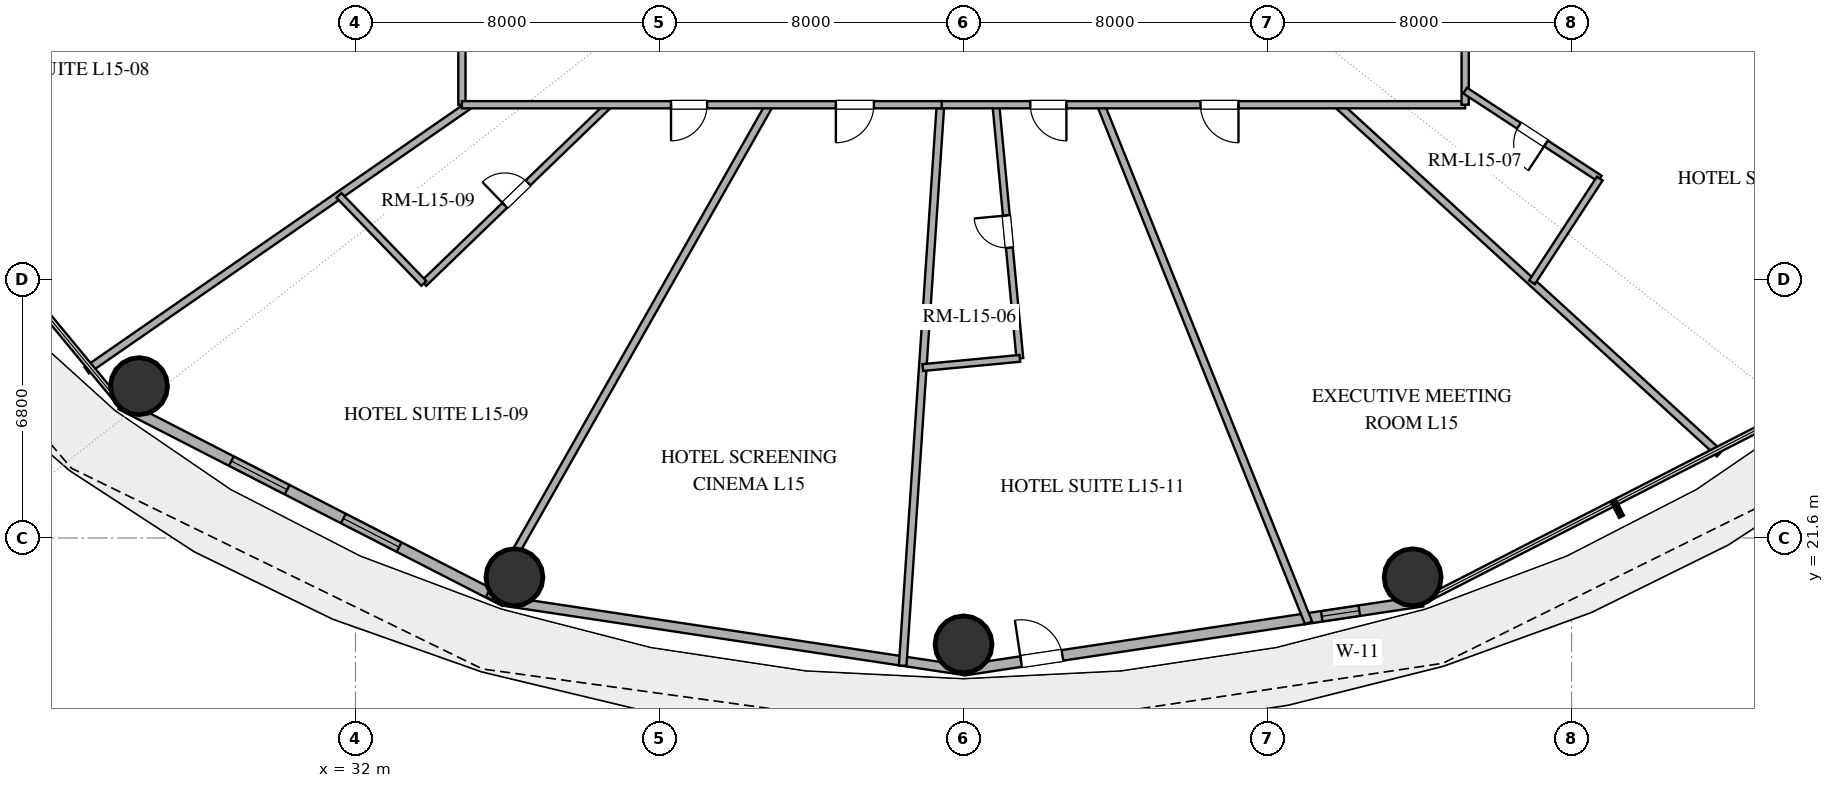
"""IFC4 building model, lengths in metres.
Left out: names, types, materials, properties, quantities, classifications, styles, units other than length and angle.
Written with IfcOpenShell. Run it as: python <this file> out.ifc"""

import sys

from ifc_helpers import new_model, si_unit, direction, frame, frame_2d, origin, origin_2d, place, context, subcontext, project, spatial, rectangle, hollow_circle, extrude, element, fill, save


model = new_model("IFC4")
c1 = context("Model", 3, precision=1e-05, world=origin(), true_north=direction((0.0, 1.0)))
c2 = subcontext(c1, "Body", "Model", "MODEL_VIEW")
j1 = project(units=[si_unit("LENGTHUNIT", "METRE"), si_unit("PLANEANGLEUNIT", "RADIAN")], contexts=[c1])
p1 = place(None, origin())
s1 = spatial("IfcSite", under=j1, at=p1, CompositionType="ELEMENT")
p2 = place(p1, origin())
s2 = spatial("IfcBuilding", under=s1, at=p2, CompositionType="ELEMENT")
p3 = place(p2, frame((0.0, 0.0, 64.2)))
s3 = spatial("IfcBuildingStorey", under=s2, at=p3, CompositionType="ELEMENT", Elevation=64.2)
for number, where, z_axis, x_axis in (
    (1, (26.303, 25.595, 0.0), (0.0, 0.0, 1.0), (1.0, 0.0, 0.0)),
    (2, (36.182, 20.566, 0.0), (0.0, 0.0, 1.0), (1.0, 0.0, 0.0)),
    (3, (48.0, 18.8, 0.0), (0.0, 0.0, 1.0), (1.0, 0.0, 0.0)),
    (4, (59.818, 20.566, 0.0), (0.0, 0.0, 1.0), (1.0, 0.0, 0.0)),
):
    element("IfcColumn", number, at=place(p3, frame(where, z_axis=z_axis, x_axis=x_axis)), inside=s3, PredefinedType="COLUMN", context=c2, shape_type="SweptSolid", body=[
        extrude(hollow_circle(Radius=0.75, WallThickness=0.04, at=origin_2d()), origin(), (0.0, 0.0, 1.0), 3.38),
    ])
p4 = place(p3, frame((25.826, 25.114, 0.0), z_axis=(0.0, 0.0, 1.0), x_axis=(0.889853976658, -0.456245438581, 0.0)))
e5 = element("IfcWall", 5, at=p4, inside=s3, PredefinedType="SOLIDWALL", context=c2, shape_type="SweptSolid", body=[
    extrude(rectangle(XDim=11.346, YDim=0.28, at=frame_2d((5.673, 0.0))), origin(), (0.0, 0.0, 1.0), 3.38),
])
p5 = place(p4, frame((3.267, 0.0, 0.85)))
e6 = element("IfcOpeningElement", 6, at=p5, cuts=e5, PredefinedType="OPENING", context=c2, shape_type="SweptSolid", body=[
    extrude(rectangle(XDim=1.65, YDim=2.0, at=frame_2d((0.825, 1.0))), frame((0.0, 0.15, 0.0), z_axis=(0.0, -1.0, 0.0), x_axis=(1.0, 0.0, 0.0)), (0.0, 0.0, 1.0), 0.3),
])
p6 = place(p4, frame((6.579, 0.0, 0.85)))
e7 = element("IfcOpeningElement", 7, at=p6, cuts=e5, PredefinedType="OPENING", context=c2, shape_type="SweptSolid", body=[
    extrude(rectangle(XDim=1.65, YDim=2.0, at=frame_2d((0.825, 1.0))), frame((0.0, 0.15, 0.0), z_axis=(0.0, -1.0, 0.0), x_axis=(1.0, 0.0, 0.0)), (0.0, 0.0, 1.0), 0.3),
])
p7 = place(p3, frame((35.922, 19.938, 0.0), z_axis=(0.0, 0.0, 1.0), x_axis=(0.988864835849, -0.148816452121, 0.0)))
e8 = element("IfcWall", 8, at=p7, inside=s3, PredefinedType="SOLIDWALL", context=c2, shape_type="SweptSolid", body=[
    extrude(rectangle(XDim=12.214, YDim=0.25, at=frame_2d((6.107, 0.0))), origin(), (0.0, 0.0, 1.0), 3.38),
])
p8 = place(p3, frame((48.0, 18.12, 0.0), z_axis=(0.0, 0.0, 1.0), x_axis=(0.988864835849, 0.148816452121, 0.0)))
e9 = element("IfcWall", 9, at=p8, inside=s3, PredefinedType="SOLIDWALL", context=c2, shape_type="SweptSolid", body=[
    extrude(rectangle(XDim=12.214, YDim=0.28, at=frame_2d((6.107, 0.0))), origin(), (0.0, 0.0, 1.0), 3.38),
])
p9 = place(p8, frame((1.531, 0.0, 0.0)))
e10 = element("IfcOpeningElement", 10, at=p9, cuts=e9, PredefinedType="OPENING", context=c2, shape_type="SweptSolid", body=[
    extrude(rectangle(XDim=1.1, YDim=2.25, at=frame_2d((0.55, 1.125))), frame((0.0, 0.15, 0.0), z_axis=(0.0, -1.0, 0.0), x_axis=(1.0, 0.0, 0.0)), (0.0, 0.0, 1.0), 0.3),
])
p10 = place(p8, frame((9.531, 0.0, 0.85)))
e11 = element("IfcOpeningElement", 11, at=p10, cuts=e9, PredefinedType="OPENING", context=c2, shape_type="SweptSolid", body=[
    extrude(rectangle(XDim=1.0, YDim=1.8, at=frame_2d((0.5, 0.9))), frame((0.0, 0.15, 0.0), z_axis=(0.0, -1.0, 0.0), x_axis=(1.0, 0.0, 0.0)), (0.0, 0.0, 1.0), 0.3),
])
p11 = place(p3, frame((42.893, 33.0, 0.0), z_axis=(0.0, 0.0, 1.0), x_axis=(-0.493512300658, -0.869738816599, 0.0)))
e12 = element("IfcWall", 12, at=p11, inside=s3, PredefinedType="PARTITIONING", context=c2, shape_type="SweptSolid", body=[
    extrude(rectangle(XDim=14.938, YDim=0.2, at=frame_2d((7.469, 0.0))), origin(), (0.0, 0.0, 1.0), 2.74),
])
p12 = place(p3, frame((51.61, 33.0, 0.0), z_axis=(0.0, 0.0, 1.0), x_axis=(0.372301847193, -0.928111703717, 0.0)))
e13 = element("IfcWall", 13, at=p12, inside=s3, PredefinedType="PARTITIONING", context=c2, shape_type="SweptSolid", body=[
    extrude(rectangle(XDim=14.688, YDim=0.2, at=frame_2d((7.344, 0.0))), origin(), (0.0, 0.0, 1.0), 2.74),
])
p13 = place(p3, frame((76.816, 33.347, 0.0), z_axis=(0.0, 0.0, 1.0), x_axis=(-0.957749889613, 0.287602414708, 0.0)))
e14 = element("IfcWall", 14, at=p13, inside=s3, PredefinedType="PARTITIONING", context=c2, shape_type="SweptSolid", body=[
    extrude(rectangle(XDim=8.8, YDim=0.2, at=frame_2d((4.4, 0.0))), origin(), (0.0, 0.0, 1.0), 2.74),
])
p14 = place(p3, frame((35.009, 33.0, 0.0), z_axis=(0.0, 0.0, 1.0), x_axis=(-0.821999402566, -0.569488351226, 0.0)))
e15 = element("IfcWall", 15, at=p14, inside=s3, PredefinedType="PARTITIONING", context=c2, shape_type="SweptSolid", body=[
    extrude(rectangle(XDim=12.266, YDim=0.2, at=frame_2d((6.133, 0.0))), origin(), (0.0, 0.0, 1.0), 2.74),
])
p15 = place(p3, frame((47.393, 33.0, 0.0), z_axis=(0.0, 0.0, 1.0), x_axis=(-0.067284649742, -0.997733820169, 0.0)))
e16 = element("IfcWall", 16, at=p15, inside=s3, PredefinedType="PARTITIONING", context=c2, shape_type="SweptSolid", body=[
    extrude(rectangle(XDim=14.793, YDim=0.2, at=frame_2d((7.396, 0.0))), origin(), (0.0, 0.0, 1.0), 2.74),
])
p16 = place(p3, frame((57.846, 33.0, 0.0), z_axis=(0.0, 0.0, 1.0), x_axis=(0.738119160364, -0.674670367738, 0.0)))
e17 = element("IfcWall", 17, at=p16, inside=s3, PredefinedType="PARTITIONING", context=c2, shape_type="SweptSolid", body=[
    extrude(rectangle(XDim=13.61, YDim=0.2, at=frame_2d((6.805, 0.0))), origin(), (0.0, 0.0, 1.0), 2.74),
])
p17 = place(p3, frame((33.798, 28.299, 0.0), z_axis=(0.0, 0.0, 1.0), x_axis=(0.719667322044, 0.69431905172, 0.0)))
e18 = element("IfcWall", 18, at=p17, inside=s3, PredefinedType="PLUMBINGWALL", context=c2, shape_type="SweptSolid", body=[
    extrude(rectangle(XDim=6.771, YDim=0.18, at=frame_2d((3.385, 0.0))), origin(), (0.0, 0.0, 1.0), 2.74),
])
p18 = place(p17, frame((2.96, 0.0, 0.0)))
e19 = element("IfcOpeningElement", 19, at=p18, cuts=e18, PredefinedType="OPENING", context=c2, shape_type="SweptSolid", body=[
    extrude(rectangle(XDim=0.85, YDim=2.1, at=frame_2d((0.425, 1.05))), frame((0.0, 0.1, 0.0), z_axis=(0.0, -1.0, 0.0), x_axis=(1.0, 0.0, 0.0)), (0.0, 0.0, 1.0), 0.2),
])
p19 = place(p3, frame((49.482, 26.326, 0.0), z_axis=(0.0, 0.0, 1.0), x_axis=(-0.094107851527, 0.995562008255, 0.0)))
e20 = element("IfcWall", 20, at=p19, inside=s3, PredefinedType="PLUMBINGWALL", context=c2, shape_type="SweptSolid", body=[
    extrude(rectangle(XDim=6.704, YDim=0.18, at=frame_2d((3.352, 0.0))), origin(), (0.0, 0.0, 1.0), 2.74),
])
p20 = place(p19, frame((2.927, 0.0, 0.0)))
e21 = element("IfcOpeningElement", 21, at=p20, cuts=e20, PredefinedType="OPENING", context=c2, shape_type="SweptSolid", body=[
    extrude(rectangle(XDim=0.85, YDim=2.1, at=frame_2d((0.425, 1.05))), frame((0.0, 0.1, 0.0), z_axis=(0.0, -1.0, 0.0), x_axis=(1.0, 0.0, 0.0)), (0.0, 0.0, 1.0), 0.2),
])
p21 = place(p3, frame((61.2, 33.0, 0.0), z_axis=(0.0, 0.0, 1.0), x_axis=(-1.0, 0.0, 0.0)))
e22 = element("IfcWall", 22, at=p21, inside=s3, PredefinedType="PARTITIONING", context=c2, shape_type="SweptSolid", body=[
    extrude(rectangle(XDim=13.839, YDim=0.19, at=frame_2d((6.919, 0.0))), origin(), (0.0, 0.0, 1.0), 2.74),
])
p22 = place(p21, frame((5.965, 0.0, 0.0)))
e23 = element("IfcOpeningElement", 23, at=p22, cuts=e22, PredefinedType="OPENING", context=c2, shape_type="SweptSolid", body=[
    extrude(rectangle(XDim=1.0, YDim=2.2, at=frame_2d((0.5, 1.1))), frame((0.0, 0.105, 0.0), z_axis=(0.0, -1.0, 0.0), x_axis=(1.0, 0.0, 0.0)), (0.0, 0.0, 1.0), 0.21),
])
p23 = place(p21, frame((10.493, 0.0, 0.0)))
e24 = element("IfcOpeningElement", 24, at=p23, cuts=e22, PredefinedType="OPENING", context=c2, shape_type="SweptSolid", body=[
    extrude(rectangle(XDim=0.95, YDim=2.15, at=frame_2d((0.475, 1.075))), frame((0.0, 0.105, 0.0), z_axis=(0.0, -1.0, 0.0), x_axis=(1.0, 0.0, 0.0)), (0.0, 0.0, 1.0), 0.21),
])
p24 = place(p3, frame((61.2, 38.07, 0.0), z_axis=(0.0, 0.0, 1.0), x_axis=(0.0, -1.0, 0.0)))
e25 = element("IfcWall", 25, at=p24, inside=s3, PredefinedType="PARTITIONING", context=c2, shape_type="SweptSolid", body=[
    extrude(rectangle(XDim=5.07, YDim=0.19, at=frame_2d((2.535, 0.0))), origin(), (0.0, 0.0, 1.0), 2.74),
])
p25 = place(p24, frame((1.893, 0.0, 0.0)))
e26 = element("IfcOpeningElement", 26, at=p25, cuts=e25, PredefinedType="OPENING", context=c2, shape_type="SweptSolid", body=[
    extrude(rectangle(XDim=0.95, YDim=2.15, at=frame_2d((0.475, 1.075))), frame((0.0, 0.105, 0.0), z_axis=(0.0, -1.0, 0.0), x_axis=(1.0, 0.0, 0.0)), (0.0, 0.0, 1.0), 0.21),
])
p26 = place(p3, frame((34.8, 33.0, 0.0), z_axis=(0.0, 0.0, 1.0), x_axis=(0.0, 1.0, 0.0)))
e27 = element("IfcWall", 27, at=p26, inside=s3, PredefinedType="PARTITIONING", context=c2, shape_type="SweptSolid", body=[
    extrude(rectangle(XDim=6.942, YDim=0.19, at=frame_2d((3.471, 0.0))), origin(), (0.0, 0.0, 1.0), 2.74),
])
p27 = place(p26, frame((1.865, 0.0, 0.0)))
e28 = element("IfcOpeningElement", 28, at=p27, cuts=e27, PredefinedType="OPENING", context=c2, shape_type="SweptSolid", body=[
    extrude(rectangle(XDim=0.95, YDim=2.15, at=frame_2d((0.475, 1.075))), frame((0.0, 0.105, 0.0), z_axis=(0.0, -1.0, 0.0), x_axis=(1.0, 0.0, 0.0)), (0.0, 0.0, 1.0), 0.21),
])
p28 = place(p3, frame((47.425, 33.0, 0.0), z_axis=(0.0, 0.0, 1.0), x_axis=(-1.0, 0.0, 0.0)))
e29 = element("IfcWall", 29, at=p28, inside=s3, PredefinedType="PARTITIONING", context=c2, shape_type="SweptSolid", body=[
    extrude(rectangle(XDim=12.625, YDim=0.19, at=frame_2d((6.312, 0.0))), origin(), (0.0, 0.0, 1.0), 2.74),
])
p29 = place(p28, frame((1.784, 0.0, 0.0)))
e30 = element("IfcOpeningElement", 30, at=p29, cuts=e29, PredefinedType="OPENING", context=c2, shape_type="SweptSolid", body=[
    extrude(rectangle(XDim=1.0, YDim=2.2, at=frame_2d((0.5, 1.1))), frame((0.0, 0.105, 0.0), z_axis=(0.0, -1.0, 0.0), x_axis=(1.0, 0.0, 0.0)), (0.0, 0.0, 1.0), 0.21),
])
p30 = place(p28, frame((6.173, 0.0, 0.0)))
e31 = element("IfcOpeningElement", 31, at=p30, cuts=e29, PredefinedType="OPENING", context=c2, shape_type="SweptSolid", body=[
    extrude(rectangle(XDim=0.95, YDim=2.15, at=frame_2d((0.475, 1.075))), frame((0.0, 0.105, 0.0), z_axis=(0.0, -1.0, 0.0), x_axis=(1.0, 0.0, 0.0)), (0.0, 0.0, 1.0), 0.21),
])
p31 = place(p3, frame((64.742, 31.056, 0.0), z_axis=(0.0, 0.0, 1.0), x_axis=(-0.837031612028, 0.5471545307, 0.0)))
e32 = element("IfcWall", 32, at=p31, inside=s3, PredefinedType="PLUMBINGWALL", context=c2, shape_type="SweptSolid", body=[
    extrude(rectangle(XDim=4.231, YDim=0.18, at=frame_2d((2.116, 0.0))), origin(), (0.0, 0.0, 1.0), 2.74),
])
p32 = place(p31, frame((1.691, 0.0, 0.0)))
e33 = element("IfcOpeningElement", 33, at=p32, cuts=e32, PredefinedType="OPENING", context=c2, shape_type="SweptSolid", body=[
    extrude(rectangle(XDim=0.85, YDim=2.1, at=frame_2d((0.425, 1.05))), frame((0.0, 0.1, 0.0), z_axis=(0.0, -1.0, 0.0), x_axis=(1.0, 0.0, 0.0)), (0.0, 0.0, 1.0), 0.2),
])
p33 = place(p3, frame((62.958, 28.328, 0.0), z_axis=(0.0, 0.0, 1.0), x_axis=(0.547176717469, 0.837017108463, 0.0)))
e34 = element("IfcWall", 34, at=p33, inside=s3, PredefinedType="PLUMBINGWALL", context=c2, shape_type="SweptSolid", body=[
    extrude(rectangle(XDim=3.26, YDim=0.18, at=frame_2d((1.63, 0.0))), origin(), (0.0, 0.0, 1.0), 2.74),
])
p34 = place(p3, frame((31.565, 30.614, 0.0), z_axis=(0.0, 0.0, 1.0), x_axis=(0.694278833189, -0.719706121821, 0.0)))
e35 = element("IfcWall", 35, at=p34, inside=s3, PredefinedType="PLUMBINGWALL", context=c2, shape_type="SweptSolid", body=[
    extrude(rectangle(XDim=3.217, YDim=0.18, at=frame_2d((1.608, 0.0))), origin(), (0.0, 0.0, 1.0), 2.74),
])
p35 = place(p3, frame((46.927, 26.085, 0.0), z_axis=(0.0, 0.0, 1.0), x_axis=(0.995563205557, 0.09409518447, 0.0)))
e36 = element("IfcWall", 36, at=p35, inside=s3, PredefinedType="PLUMBINGWALL", context=c2, shape_type="SweptSolid", body=[
    extrude(rectangle(XDim=2.566, YDim=0.18, at=frame_2d((1.283, 0.0))), origin(), (0.0, 0.0, 1.0), 2.74),
])
p36 = place(p5, origin())
e37 = element("IfcWindow", 37, at=p36, inside=s3, PartitioningType="SINGLE_PANEL", PredefinedType="WINDOW", context=c2, shape_type="SweptSolid", body=[
    extrude(rectangle(XDim=1.65, YDim=2.0, at=frame_2d((0.825, 1.0))), frame((0.0, 0.03, 0.0), z_axis=(0.0, -1.0, 0.0), x_axis=(1.0, 0.0, 0.0)), (0.0, 0.0, 1.0), 0.06),
])
fill(e6, e37)
p37 = place(p6, origin())
e38 = element("IfcWindow", 38, at=p37, inside=s3, PartitioningType="SINGLE_PANEL", PredefinedType="WINDOW", context=c2, shape_type="SweptSolid", body=[
    extrude(rectangle(XDim=1.65, YDim=2.0, at=frame_2d((0.825, 1.0))), frame((0.0, 0.03, 0.0), z_axis=(0.0, -1.0, 0.0), x_axis=(1.0, 0.0, 0.0)), (0.0, 0.0, 1.0), 0.06),
])
fill(e7, e38)
p38 = place(p9, origin())
e39 = element("IfcDoor", 39, at=p38, inside=s3, OperationType="SINGLE_SWING_LEFT", PredefinedType="DOOR", context=c2, shape_type="SweptSolid", body=[
    extrude(rectangle(XDim=1.1, YDim=2.25, at=frame_2d((0.55, 1.125))), frame((0.0, 0.025, 0.0), z_axis=(0.0, -1.0, 0.0), x_axis=(1.0, 0.0, 0.0)), (0.0, 0.0, 1.0), 0.05),
])
fill(e10, e39)
p39 = place(p10, origin())
e40 = element("IfcWindow", 40, at=p39, inside=s3, PartitioningType="SINGLE_PANEL", PredefinedType="WINDOW", context=c2, shape_type="SweptSolid", body=[
    extrude(rectangle(XDim=1.0, YDim=1.8, at=frame_2d((0.5, 0.9))), frame((0.0, 0.03, 0.0), z_axis=(0.0, -1.0, 0.0), x_axis=(1.0, 0.0, 0.0)), (0.0, 0.0, 1.0), 0.06),
])
fill(e11, e40)
p40 = place(p18, origin())
e41 = element("IfcDoor", 41, at=p40, inside=s3, OperationType="SINGLE_SWING_LEFT", PredefinedType="DOOR", context=c2, shape_type="SweptSolid", body=[
    extrude(rectangle(XDim=0.85, YDim=2.1, at=frame_2d((0.425, 1.05))), frame((0.0, 0.025, 0.0), z_axis=(0.0, -1.0, 0.0), x_axis=(1.0, 0.0, 0.0)), (0.0, 0.0, 1.0), 0.05),
])
fill(e19, e41)
p41 = place(p20, origin())
e42 = element("IfcDoor", 42, at=p41, inside=s3, OperationType="SINGLE_SWING_RIGHT", PredefinedType="DOOR", context=c2, shape_type="SweptSolid", body=[
    extrude(rectangle(XDim=0.85, YDim=2.1, at=frame_2d((0.425, 1.05))), frame((0.0, 0.025, 0.0), z_axis=(0.0, -1.0, 0.0), x_axis=(1.0, 0.0, 0.0)), (0.0, 0.0, 1.0), 0.05),
])
fill(e21, e42)
p42 = place(p22, origin())
e43 = element("IfcDoor", 43, at=p42, inside=s3, OperationType="SINGLE_SWING_LEFT", PredefinedType="DOOR", context=c2, shape_type="SweptSolid", body=[
    extrude(rectangle(XDim=1.0, YDim=2.2, at=frame_2d((0.5, 1.1))), frame((0.0, 0.025, 0.0), z_axis=(0.0, -1.0, 0.0), x_axis=(1.0, 0.0, 0.0)), (0.0, 0.0, 1.0), 0.05),
])
fill(e23, e43)
p43 = place(p23, origin())
e44 = element("IfcDoor", 44, at=p43, inside=s3, OperationType="SINGLE_SWING_LEFT", PredefinedType="DOOR", context=c2, shape_type="SweptSolid", body=[
    extrude(rectangle(XDim=0.95, YDim=2.15, at=frame_2d((0.475, 1.075))), frame((0.0, 0.025, 0.0), z_axis=(0.0, -1.0, 0.0), x_axis=(1.0, 0.0, 0.0)), (0.0, 0.0, 1.0), 0.05),
])
fill(e24, e44)
p44 = place(p29, origin())
e45 = element("IfcDoor", 45, at=p44, inside=s3, OperationType="SINGLE_SWING_RIGHT", PredefinedType="DOOR", context=c2, shape_type="SweptSolid", body=[
    extrude(rectangle(XDim=1.0, YDim=2.2, at=frame_2d((0.5, 1.1))), frame((0.0, 0.025, 0.0), z_axis=(0.0, -1.0, 0.0), x_axis=(1.0, 0.0, 0.0)), (0.0, 0.0, 1.0), 0.05),
])
fill(e30, e45)
p45 = place(p30, origin())
e46 = element("IfcDoor", 46, at=p45, inside=s3, OperationType="SINGLE_SWING_RIGHT", PredefinedType="DOOR", context=c2, shape_type="SweptSolid", body=[
    extrude(rectangle(XDim=0.95, YDim=2.15, at=frame_2d((0.475, 1.075))), frame((0.0, 0.025, 0.0), z_axis=(0.0, -1.0, 0.0), x_axis=(1.0, 0.0, 0.0)), (0.0, 0.0, 1.0), 0.05),
])
fill(e31, e46)
p46 = place(p32, origin())
e47 = element("IfcDoor", 47, at=p46, inside=s3, OperationType="SINGLE_SWING_LEFT", PredefinedType="DOOR", context=c2, shape_type="SweptSolid", body=[
    extrude(rectangle(XDim=0.85, YDim=2.1, at=frame_2d((0.425, 1.05))), frame((0.0, 0.025, 0.0), z_axis=(0.0, -1.0, 0.0), x_axis=(1.0, 0.0, 0.0)), (0.0, 0.0, 1.0), 0.05),
])
fill(e33, e47)
save(model, sys.argv[1])
